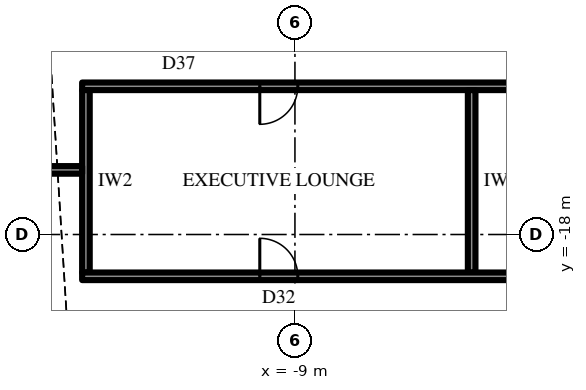
"""IFC4 building model, lengths in metres.
Left out: names, types, materials, properties, quantities, classifications, styles, units other than length and angle.
Written with IfcOpenShell. Run it as: python <this file> out.ifc"""

import sys

from ifc_helpers import new_model, si_unit, direction, frame, frame_2d, origin, place, context, subcontext, project, spatial, rectangle, extrude, element, fill, save


model = new_model("IFC4")
c1 = context("Model", 3, precision=1e-05, world=origin(), true_north=direction((0.0, 1.0)))
c2 = subcontext(c1, "Body", "Model", "MODEL_VIEW")
j1 = project(units=[si_unit("LENGTHUNIT", "METRE"), si_unit("PLANEANGLEUNIT", "RADIAN")], contexts=[c1])
p1 = place(None, origin())
s1 = spatial("IfcSite", under=j1, at=p1, CompositionType="ELEMENT")
p2 = place(p1, origin())
s2 = spatial("IfcBuilding", under=s1, at=p2, CompositionType="ELEMENT")
p3 = place(p2, frame((0.0, 0.0, 306.5)))
s3 = spatial("IfcBuildingStorey", under=s2, at=p3, CompositionType="ELEMENT", Elevation=306.5)
p4 = place(p3, frame((14.6, -14.1, 0.0), z_axis=(0.0, 0.0, 1.0), x_axis=(-1.0, 0.0, 0.0)))
e1 = element("IfcWall", 1, at=p4, inside=s3, PredefinedType="PARTITIONING", context=c2, shape_type="SweptSolid", body=[
    extrude(rectangle(XDim=29.2, YDim=0.2, at=frame_2d((14.6, 0.0))), origin(), (0.0, 0.0, 1.0), 4.8),
])
p5 = place(p4, frame((5.4, 0.0, 0.0)))
e2 = element("IfcOpeningElement", 2, at=p5, cuts=e1, PredefinedType="OPENING", context=c2, shape_type="SweptSolid", body=[
    extrude(rectangle(XDim=1.0, YDim=2.2, at=frame_2d((0.5, 1.1))), frame((0.0, 0.11, 0.0), z_axis=(0.0, -1.0, 0.0), x_axis=(1.0, 0.0, 0.0)), (0.0, 0.0, 1.0), 0.22),
])
p6 = place(p4, frame((14.425, 0.0, 0.0)))
e3 = element("IfcOpeningElement", 3, at=p6, cuts=e1, PredefinedType="OPENING", context=c2, shape_type="SweptSolid", body=[
    extrude(rectangle(XDim=1.8, YDim=2.4, at=frame_2d((0.9, 1.2))), frame((0.0, 0.11, 0.0), z_axis=(0.0, -1.0, 0.0), x_axis=(1.0, 0.0, 0.0)), (0.0, 0.0, 1.0), 0.22),
])
p7 = place(p4, frame((23.525, 0.0, 0.0)))
e4 = element("IfcOpeningElement", 4, at=p7, cuts=e1, PredefinedType="OPENING", context=c2, shape_type="SweptSolid", body=[
    extrude(rectangle(XDim=1.0, YDim=2.2, at=frame_2d((0.5, 1.1))), frame((0.0, 0.11, 0.0), z_axis=(0.0, -1.0, 0.0), x_axis=(1.0, 0.0, 0.0)), (0.0, 0.0, 1.0), 0.22),
])
p8 = place(p3, frame((-4.35, -14.2, 0.0), z_axis=(0.0, 0.0, 1.0), x_axis=(0.0, -1.0, 0.0)))
e5 = element("IfcWall", 5, at=p8, inside=s3, PredefinedType="PARTITIONING", context=c2, shape_type="SweptSolid", body=[
    extrude(rectangle(XDim=4.8, YDim=0.2, at=frame_2d((2.4, 0.0))), origin(), (0.0, 0.0, 1.0), 3.792),
])
p9 = place(p3, frame((-14.5, -14.2, 0.0), z_axis=(0.0, 0.0, 1.0), x_axis=(0.0, -1.0, 0.0)))
e6 = element("IfcWall", 6, at=p9, inside=s3, PredefinedType="PARTITIONING", context=c2, shape_type="SweptSolid", body=[
    extrude(rectangle(XDim=4.8, YDim=0.2, at=frame_2d((2.4, 0.0))), origin(), (0.0, 0.0, 1.0), 4.8),
])
p10 = place(p3, frame((14.6, -19.1, 0.0), z_axis=(0.0, 0.0, 1.0), x_axis=(-1.0, 0.0, 0.0)))
e7 = element("IfcWall", 7, at=p10, inside=s3, PredefinedType="PARTITIONING", context=c2, shape_type="SweptSolid", body=[
    extrude(rectangle(XDim=29.2, YDim=0.2, at=frame_2d((14.6, 0.0))), origin(), (0.0, 0.0, 1.0), 4.8),
])
p11 = place(p10, frame((5.4, 0.0, 0.0)))
e8 = element("IfcOpeningElement", 8, at=p11, cuts=e7, PredefinedType="OPENING", context=c2, shape_type="SweptSolid", body=[
    extrude(rectangle(XDim=1.0, YDim=2.2, at=frame_2d((0.5, 1.1))), frame((0.0, 0.11, 0.0), z_axis=(0.0, -1.0, 0.0), x_axis=(1.0, 0.0, 0.0)), (0.0, 0.0, 1.0), 0.22),
])
p12 = place(p10, frame((14.425, 0.0, 0.0)))
e9 = element("IfcOpeningElement", 9, at=p12, cuts=e7, PredefinedType="OPENING", context=c2, shape_type="SweptSolid", body=[
    extrude(rectangle(XDim=1.8, YDim=2.4, at=frame_2d((0.9, 1.2))), frame((0.0, 0.11, 0.0), z_axis=(0.0, -1.0, 0.0), x_axis=(1.0, 0.0, 0.0)), (0.0, 0.0, 1.0), 0.22),
])
p13 = place(p10, frame((23.525, 0.0, 0.0)))
e10 = element("IfcOpeningElement", 10, at=p13, cuts=e7, PredefinedType="OPENING", context=c2, shape_type="SweptSolid", body=[
    extrude(rectangle(XDim=1.0, YDim=2.2, at=frame_2d((0.5, 1.1))), frame((0.0, 0.11, 0.0), z_axis=(0.0, -1.0, 0.0), x_axis=(1.0, 0.0, 0.0)), (0.0, 0.0, 1.0), 0.22),
])
p14 = place(p3, frame((-14.6, -16.3, 0.0), z_axis=(0.0, 0.0, 1.0), x_axis=(-1.0, 0.0, 0.0)))
e11 = element("IfcWall", 11, at=p14, inside=s3, PredefinedType="PARTITIONING", context=c2, shape_type="SweptSolid", body=[
    extrude(rectangle(XDim=4.8, YDim=0.2, at=frame_2d((2.4, 0.0))), origin(), (0.0, 0.0, 1.0), 4.8),
])
p15 = place(p13, frame((1.0, 0.0, 0.0), z_axis=(0.0, 0.0, 1.0), x_axis=(-1.0, 0.0, 0.0)))
e12 = element("IfcDoor", 12, at=p15, inside=s3, OperationType="SINGLE_SWING_RIGHT", PredefinedType="DOOR", context=c2, shape_type="SweptSolid", body=[
    extrude(rectangle(XDim=1.0, YDim=2.2, at=frame_2d((0.5, 1.1))), frame((0.0, 0.025, 0.0), z_axis=(0.0, -1.0, 0.0), x_axis=(1.0, 0.0, 0.0)), (0.0, 0.0, 1.0), 0.05),
])
fill(e10, e12)
p16 = place(p7, origin())
e13 = element("IfcDoor", 13, at=p16, inside=s3, OperationType="SINGLE_SWING_LEFT", PredefinedType="DOOR", context=c2, shape_type="SweptSolid", body=[
    extrude(rectangle(XDim=1.0, YDim=2.2, at=frame_2d((0.5, 1.1))), frame((0.0, 0.025, 0.0), z_axis=(0.0, -1.0, 0.0), x_axis=(1.0, 0.0, 0.0)), (0.0, 0.0, 1.0), 0.05),
])
fill(e4, e13)
save(model, sys.argv[1])
